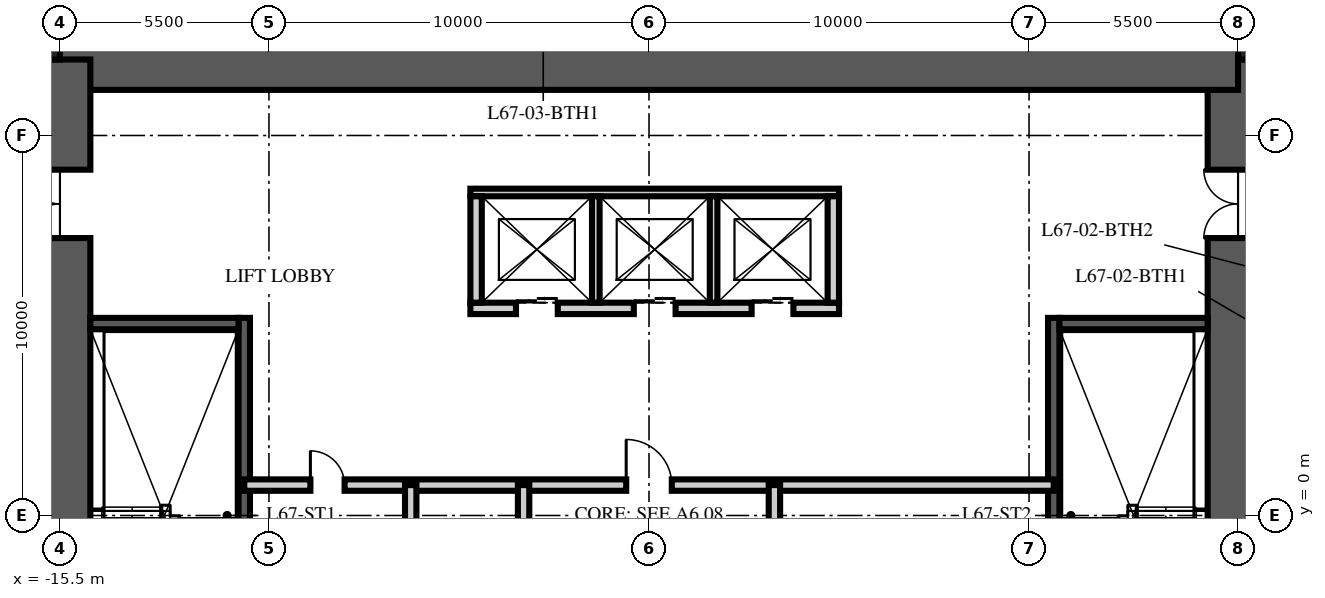
"""IFC4 building model, lengths in metres.
Left out: names, types, materials, properties, quantities, classifications, styles, units other than length and angle.
Written with IfcOpenShell. Run it as: python <this file> out.ifc"""

import sys

from ifc_helpers import new_model, si_unit, direction, frame, frame_2d, origin, origin_2d, place, context, subcontext, project, spatial, rectangle, extrude, element, fill, save


model = new_model("IFC4")
c1 = context("Model", 3, precision=1e-05, world=origin(), true_north=direction((0.0, 1.0)))
c2 = subcontext(c1, "Body", "Model", "MODEL_VIEW")
j1 = project(units=[si_unit("LENGTHUNIT", "METRE"), si_unit("PLANEANGLEUNIT", "RADIAN")], contexts=[c1])
p1 = place(None, origin())
s1 = spatial("IfcSite", under=j1, at=p1, CompositionType="ELEMENT")
p2 = place(p1, origin())
s2 = spatial("IfcBuilding", under=s1, at=p2, CompositionType="ELEMENT")
p3 = place(p2, frame((0.0, 0.0, 267.0)))
s3 = spatial("IfcBuildingStorey", under=s2, at=p3, CompositionType="ELEMENT", Elevation=267.0)
p4 = place(p3, frame((15.5, -12.0, -0.25), z_axis=(0.0, 0.0, 1.0), x_axis=(0.0, 1.0, 0.0)))
e1 = element("IfcWall", 1, at=p4, inside=s3, PredefinedType="SHEAR", context=c2, shape_type="SweptSolid", body=[
    extrude(rectangle(XDim=24.0, YDim=1.6, at=frame_2d((12.0, 0.0))), origin(), (0.0, 0.0, 1.0), 3.75),
])
p5 = place(p4, frame((3.2, 0.0, 0.25)))
e2 = element("IfcOpeningElement", 2, at=p5, cuts=e1, PredefinedType="OPENING", context=c2, shape_type="SweptSolid", body=[
    extrude(rectangle(XDim=1.2, YDim=2.1, at=frame_2d((0.6, 1.05))), frame((0.0, 0.81, 0.0), z_axis=(0.0, -1.0, 0.0), x_axis=(1.0, 0.0, 0.0)), (0.0, 0.0, 1.0), 1.62),
])
p6 = place(p4, frame((19.3, 0.0, 0.25)))
e3 = element("IfcOpeningElement", 3, at=p6, cuts=e1, PredefinedType="OPENING", context=c2, shape_type="SweptSolid", body=[
    extrude(rectangle(XDim=1.8, YDim=2.1, at=frame_2d((0.9, 1.05))), frame((0.0, 0.81, 0.0), z_axis=(0.0, -1.0, 0.0), x_axis=(1.0, 0.0, 0.0)), (0.0, 0.0, 1.0), 1.62),
])
p7 = place(p3, frame((-15.5, 12.0, -0.25), z_axis=(0.0, 0.0, 1.0), x_axis=(1.0, 0.0, 0.0)))
e4 = element("IfcWall", 4, at=p7, inside=s3, PredefinedType="SHEAR", context=c2, shape_type="SweptSolid", body=[
    extrude(rectangle(XDim=31.0, YDim=1.6, at=frame_2d((15.5, 0.0))), origin(), (0.0, 0.0, 1.0), 3.75),
])
p8 = place(p3, frame((-15.5, -12.0, -0.25), z_axis=(0.0, 0.0, 1.0), x_axis=(0.0, 1.0, 0.0)))
e5 = element("IfcWall", 5, at=p8, inside=s3, PredefinedType="SHEAR", context=c2, shape_type="SweptSolid", body=[
    extrude(rectangle(XDim=24.0, YDim=1.6, at=frame_2d((12.0, 0.0))), origin(), (0.0, 0.0, 1.0), 3.75),
])
p9 = place(p8, frame((3.2, 0.0, 0.25)))
e6 = element("IfcOpeningElement", 6, at=p9, cuts=e5, PredefinedType="OPENING", context=c2, shape_type="SweptSolid", body=[
    extrude(rectangle(XDim=1.2, YDim=2.1, at=frame_2d((0.6, 1.05))), frame((0.0, 0.81, 0.0), z_axis=(0.0, -1.0, 0.0), x_axis=(1.0, 0.0, 0.0)), (0.0, 0.0, 1.0), 1.62),
])
p10 = place(p8, frame((19.3, 0.0, 0.25)))
e7 = element("IfcOpeningElement", 7, at=p10, cuts=e5, PredefinedType="OPENING", context=c2, shape_type="SweptSolid", body=[
    extrude(rectangle(XDim=1.8, YDim=2.1, at=frame_2d((0.9, 1.05))), frame((0.0, 0.81, 0.0), z_axis=(0.0, -1.0, 0.0), x_axis=(1.0, 0.0, 0.0)), (0.0, 0.0, 1.0), 1.62),
])
for number, where, z_axis, x_axis in (
    (8, (15.9, 12.4, -0.25), (0.0, 0.0, 1.0), (1.0, 0.0, 0.0)),
    (9, (-15.9, 12.4, -0.25), (0.0, 0.0, 1.0), (1.0, 0.0, 0.0)),
):
    element("IfcColumn", number, at=place(p3, frame(where, z_axis=z_axis, x_axis=x_axis)), inside=s3, PredefinedType="COLUMN", context=c2, shape_type="SweptSolid", body=[
        extrude(rectangle(XDim=0.8, YDim=0.8, at=origin_2d()), origin(), (0.0, 0.0, 1.0), 3.75),
    ])
p11 = place(p3, frame((-10.65, -4.9, 0.0), z_axis=(0.0, 0.0, 1.0), x_axis=(0.0, 1.0, 0.0)))
e10 = element("IfcWall", 10, at=p11, inside=s3, PredefinedType="SOLIDWALL", context=c2, shape_type="SweptSolid", body=[
    extrude(rectangle(XDim=10.1, YDim=0.3, at=frame_2d((5.05, 0.0))), origin(), (0.0, 0.0, 1.0), 3.5),
])
p12 = place(p3, frame((-14.7, 5.05, 0.0), z_axis=(0.0, 0.0, 1.0), x_axis=(1.0, 0.0, 0.0)))
e11 = element("IfcWall", 11, at=p12, inside=s3, PredefinedType="SOLIDWALL", context=c2, shape_type="SweptSolid", body=[
    extrude(rectangle(XDim=3.9, YDim=0.3, at=frame_2d((1.95, 0.0))), origin(), (0.0, 0.0, 1.0), 3.5),
])
p13 = place(p3, frame((10.65, -4.9, 0.0), z_axis=(0.0, 0.0, 1.0), x_axis=(0.0, 1.0, 0.0)))
e12 = element("IfcWall", 12, at=p13, inside=s3, PredefinedType="SOLIDWALL", context=c2, shape_type="SweptSolid", body=[
    extrude(rectangle(XDim=10.1, YDim=0.3, at=frame_2d((5.05, 0.0))), origin(), (0.0, 0.0, 1.0), 3.5),
])
p14 = place(p3, frame((14.7, 5.05, 0.0), z_axis=(0.0, 0.0, 1.0), x_axis=(-1.0, 0.0, 0.0)))
e13 = element("IfcWall", 13, at=p14, inside=s3, PredefinedType="SOLIDWALL", context=c2, shape_type="SweptSolid", body=[
    extrude(rectangle(XDim=3.9, YDim=0.3, at=frame_2d((1.95, 0.0))), origin(), (0.0, 0.0, 1.0), 3.5),
])
p15 = place(p3, frame((-4.7, 5.45, 0.0), z_axis=(0.0, 0.0, 1.0), x_axis=(1.0, 0.0, 0.0)))
e14 = element("IfcWall", 14, at=p15, inside=s3, PredefinedType="PARTITIONING", context=c2, shape_type="SweptSolid", body=[
    extrude(rectangle(XDim=9.7, YDim=0.3, at=frame_2d((4.85, 0.0))), origin(), (0.0, 0.0, 1.0), 3.5),
])
p16 = place(p15, frame((1.2, 0.0, 0.0)))
e15 = element("IfcOpeningElement", 15, at=p16, cuts=e14, PredefinedType="OPENING", context=c2, shape_type="SweptSolid", body=[
    extrude(rectangle(XDim=1.1, YDim=2.1, at=frame_2d((0.55, 1.05))), frame((0.0, 0.16, 0.0), z_axis=(0.0, -1.0, 0.0), x_axis=(1.0, 0.0, 0.0)), (0.0, 0.0, 1.0), 0.32),
])
p17 = place(p15, frame((4.3, 0.0, 0.0)))
e16 = element("IfcOpeningElement", 16, at=p17, cuts=e14, PredefinedType="OPENING", context=c2, shape_type="SweptSolid", body=[
    extrude(rectangle(XDim=1.1, YDim=2.1, at=frame_2d((0.55, 1.05))), frame((0.0, 0.16, 0.0), z_axis=(0.0, -1.0, 0.0), x_axis=(1.0, 0.0, 0.0)), (0.0, 0.0, 1.0), 0.32),
])
p18 = place(p15, frame((7.4, 0.0, 0.0)))
e17 = element("IfcOpeningElement", 17, at=p18, cuts=e14, PredefinedType="OPENING", context=c2, shape_type="SweptSolid", body=[
    extrude(rectangle(XDim=1.1, YDim=2.1, at=frame_2d((0.55, 1.05))), frame((0.0, 0.16, 0.0), z_axis=(0.0, -1.0, 0.0), x_axis=(1.0, 0.0, 0.0)), (0.0, 0.0, 1.0), 0.32),
])
p19 = place(p3, frame((-4.7, 8.5, 0.0), z_axis=(0.0, 0.0, 1.0), x_axis=(1.0, 0.0, 0.0)))
e18 = element("IfcWall", 18, at=p19, inside=s3, PredefinedType="PARTITIONING", context=c2, shape_type="SweptSolid", body=[
    extrude(rectangle(XDim=9.7, YDim=0.2, at=frame_2d((4.85, 0.0))), origin(), (0.0, 0.0, 1.0), 3.5),
])
for number, where, z_axis, x_axis in (
    (19, (-4.55, 5.6, 0.0), (0.0, 0.0, 1.0), (0.0, 1.0, 0.0)),
    (20, (4.85, 5.6, 0.0), (0.0, 0.0, 1.0), (0.0, 1.0, 0.0)),
):
    element("IfcWall", number, at=place(p3, frame(where, z_axis=z_axis, x_axis=x_axis)), inside=s3, PredefinedType="PARTITIONING", context=c2, shape_type="SweptSolid", body=[
        extrude(rectangle(XDim=2.8, YDim=0.3, at=frame_2d((1.4, 0.0))), origin(), (0.0, 0.0, 1.0), 3.5),
    ])
for number, where, z_axis, x_axis in (
    (21, (-1.4, 5.6, 0.0), (0.0, 0.0, 1.0), (0.0, 1.0, 0.0)),
    (22, (1.7, 5.6, 0.0), (0.0, 0.0, 1.0), (0.0, 1.0, 0.0)),
):
    element("IfcWall", number, at=place(p3, frame(where, z_axis=z_axis, x_axis=x_axis)), inside=s3, PredefinedType="PARTITIONING", context=c2, shape_type="SweptSolid", body=[
        extrude(rectangle(XDim=2.8, YDim=0.2, at=frame_2d((1.4, 0.0))), origin(), (0.0, 0.0, 1.0), 3.5),
    ])
p20 = place(p3, frame((-10.65, 0.8, 0.0), z_axis=(0.0, 0.0, 1.0), x_axis=(1.0, 0.0, 0.0)))
e23 = element("IfcWall", 23, at=p20, inside=s3, PredefinedType="PARTITIONING", context=c2, shape_type="SweptSolid", body=[
    extrude(rectangle(XDim=21.3, YDim=0.3, at=frame_2d((10.65, 0.0))), origin(), (0.0, 0.0, 1.0), 3.5),
])
p21 = place(p20, frame((10.05, 0.0, 0.0)))
e24 = element("IfcOpeningElement", 24, at=p21, cuts=e23, PredefinedType="OPENING", context=c2, shape_type="SweptSolid", body=[
    extrude(rectangle(XDim=1.2, YDim=2.1, at=frame_2d((0.6, 1.05))), frame((0.0, 0.16, 0.0), z_axis=(0.0, -1.0, 0.0), x_axis=(1.0, 0.0, 0.0)), (0.0, 0.0, 1.0), 0.32),
])
p22 = place(p20, frame((1.74, 0.0, 0.0)))
e25 = element("IfcOpeningElement", 25, at=p22, cuts=e23, PredefinedType="OPENING", context=c2, shape_type="SweptSolid", body=[
    extrude(rectangle(XDim=0.9, YDim=2.1, at=frame_2d((0.45, 1.05))), frame((0.0, 0.16, 0.0), z_axis=(0.0, -1.0, 0.0), x_axis=(1.0, 0.0, 0.0)), (0.0, 0.0, 1.0), 0.32),
])
p23 = place(p3, frame((-3.3, -6.65, 0.0), z_axis=(0.0, 0.0, 1.0), x_axis=(0.0, 1.0, 0.0)))
e26 = element("IfcWall", 26, at=p23, inside=s3, PredefinedType="PARTITIONING", context=c2, shape_type="SweptSolid", body=[
    extrude(rectangle(XDim=7.45, YDim=0.3, at=frame_2d((3.725, 0.0))), origin(), (0.0, 0.0, 1.0), 3.5),
])
p24 = place(p23, frame((3.275, 0.0, 0.0)))
e27 = element("IfcOpeningElement", 27, at=p24, cuts=e26, PredefinedType="OPENING", context=c2, shape_type="SweptSolid", body=[
    extrude(rectangle(XDim=0.9, YDim=2.1, at=frame_2d((0.45, 1.05))), frame((0.0, 0.16, 0.0), z_axis=(0.0, -1.0, 0.0), x_axis=(1.0, 0.0, 0.0)), (0.0, 0.0, 1.0), 0.32),
])
p25 = place(p3, frame((3.3, -6.65, 0.0), z_axis=(0.0, 0.0, 1.0), x_axis=(0.0, 1.0, 0.0)))
e28 = element("IfcWall", 28, at=p25, inside=s3, PredefinedType="PARTITIONING", context=c2, shape_type="SweptSolid", body=[
    extrude(rectangle(XDim=7.45, YDim=0.3, at=frame_2d((3.725, 0.0))), origin(), (0.0, 0.0, 1.0), 3.5),
])
p26 = place(p25, frame((1.231, 0.0, 0.0)))
e29 = element("IfcOpeningElement", 29, at=p26, cuts=e28, PredefinedType="OPENING", context=c2, shape_type="SweptSolid", body=[
    extrude(rectangle(XDim=0.9, YDim=2.1, at=frame_2d((0.45, 1.05))), frame((0.0, 0.16, 0.0), z_axis=(0.0, -1.0, 0.0), x_axis=(1.0, 0.0, 0.0)), (0.0, 0.0, 1.0), 0.32),
])
p27 = place(p25, frame((4.956, 0.0, 0.0)))
e30 = element("IfcOpeningElement", 30, at=p27, cuts=e28, PredefinedType="OPENING", context=c2, shape_type="SweptSolid", body=[
    extrude(rectangle(XDim=0.9, YDim=2.1, at=frame_2d((0.45, 1.05))), frame((0.0, 0.16, 0.0), z_axis=(0.0, -1.0, 0.0), x_axis=(1.0, 0.0, 0.0)), (0.0, 0.0, 1.0), 0.32),
])
p28 = place(p3, frame((-6.27, -6.65, 0.0), z_axis=(0.0, 0.0, 1.0), x_axis=(0.0, 1.0, 0.0)))
e31 = element("IfcWall", 31, at=p28, inside=s3, PredefinedType="PARTITIONING", context=c2, shape_type="SweptSolid", body=[
    extrude(rectangle(XDim=7.45, YDim=0.3, at=frame_2d((3.725, 0.0))), origin(), (0.0, 0.0, 1.0), 3.5),
])
p29 = place(p10, origin())
e32 = element("IfcDoor", 32, at=p29, inside=s3, OperationType="DOUBLE_DOOR_SINGLE_SWING", PredefinedType="DOOR", context=c2, shape_type="SweptSolid", body=[
    extrude(rectangle(XDim=1.8, YDim=2.1, at=frame_2d((0.9, 1.05))), frame((0.0, 0.025, 0.0), z_axis=(0.0, -1.0, 0.0), x_axis=(1.0, 0.0, 0.0)), (0.0, 0.0, 1.0), 0.05),
])
fill(e7, e32)
p30 = place(p6, origin())
e33 = element("IfcDoor", 33, at=p30, inside=s3, OperationType="DOUBLE_DOOR_SINGLE_SWING", PredefinedType="DOOR", context=c2, shape_type="SweptSolid", body=[
    extrude(rectangle(XDim=1.8, YDim=2.1, at=frame_2d((0.9, 1.05))), frame((0.0, 0.025, 0.0), z_axis=(0.0, -1.0, 0.0), x_axis=(1.0, 0.0, 0.0)), (0.0, 0.0, 1.0), 0.05),
])
fill(e3, e33)
p31 = place(p16, origin())
e34 = element("IfcDoor", 34, at=p31, inside=s3, OperationType="DOUBLE_DOOR_SLIDING", PredefinedType="DOOR", context=c2, shape_type="SweptSolid", body=[
    extrude(rectangle(XDim=1.1, YDim=2.1, at=frame_2d((0.55, 1.05))), frame((0.0, 0.025, 0.0), z_axis=(0.0, -1.0, 0.0), x_axis=(1.0, 0.0, 0.0)), (0.0, 0.0, 1.0), 0.05),
])
fill(e15, e34)
p32 = place(p17, origin())
e35 = element("IfcDoor", 35, at=p32, inside=s3, OperationType="DOUBLE_DOOR_SLIDING", PredefinedType="DOOR", context=c2, shape_type="SweptSolid", body=[
    extrude(rectangle(XDim=1.1, YDim=2.1, at=frame_2d((0.55, 1.05))), frame((0.0, 0.025, 0.0), z_axis=(0.0, -1.0, 0.0), x_axis=(1.0, 0.0, 0.0)), (0.0, 0.0, 1.0), 0.05),
])
fill(e16, e35)
p33 = place(p18, origin())
e36 = element("IfcDoor", 36, at=p33, inside=s3, OperationType="DOUBLE_DOOR_SLIDING", PredefinedType="DOOR", context=c2, shape_type="SweptSolid", body=[
    extrude(rectangle(XDim=1.1, YDim=2.1, at=frame_2d((0.55, 1.05))), frame((0.0, 0.025, 0.0), z_axis=(0.0, -1.0, 0.0), x_axis=(1.0, 0.0, 0.0)), (0.0, 0.0, 1.0), 0.05),
])
fill(e17, e36)
p34 = place(p21, origin())
e37 = element("IfcDoor", 37, at=p34, inside=s3, OperationType="SINGLE_SWING_LEFT", PredefinedType="DOOR", context=c2, shape_type="SweptSolid", body=[
    extrude(rectangle(XDim=1.2, YDim=2.1, at=frame_2d((0.6, 1.05))), frame((0.0, 0.025, 0.0), z_axis=(0.0, -1.0, 0.0), x_axis=(1.0, 0.0, 0.0)), (0.0, 0.0, 1.0), 0.05),
])
fill(e24, e37)
p35 = place(p22, origin())
e38 = element("IfcDoor", 38, at=p35, inside=s3, OperationType="SINGLE_SWING_LEFT", PredefinedType="DOOR", context=c2, shape_type="SweptSolid", body=[
    extrude(rectangle(XDim=0.9, YDim=2.1, at=frame_2d((0.45, 1.05))), frame((0.0, 0.025, 0.0), z_axis=(0.0, -1.0, 0.0), x_axis=(1.0, 0.0, 0.0)), (0.0, 0.0, 1.0), 0.05),
])
fill(e25, e38)
save(model, sys.argv[1])
